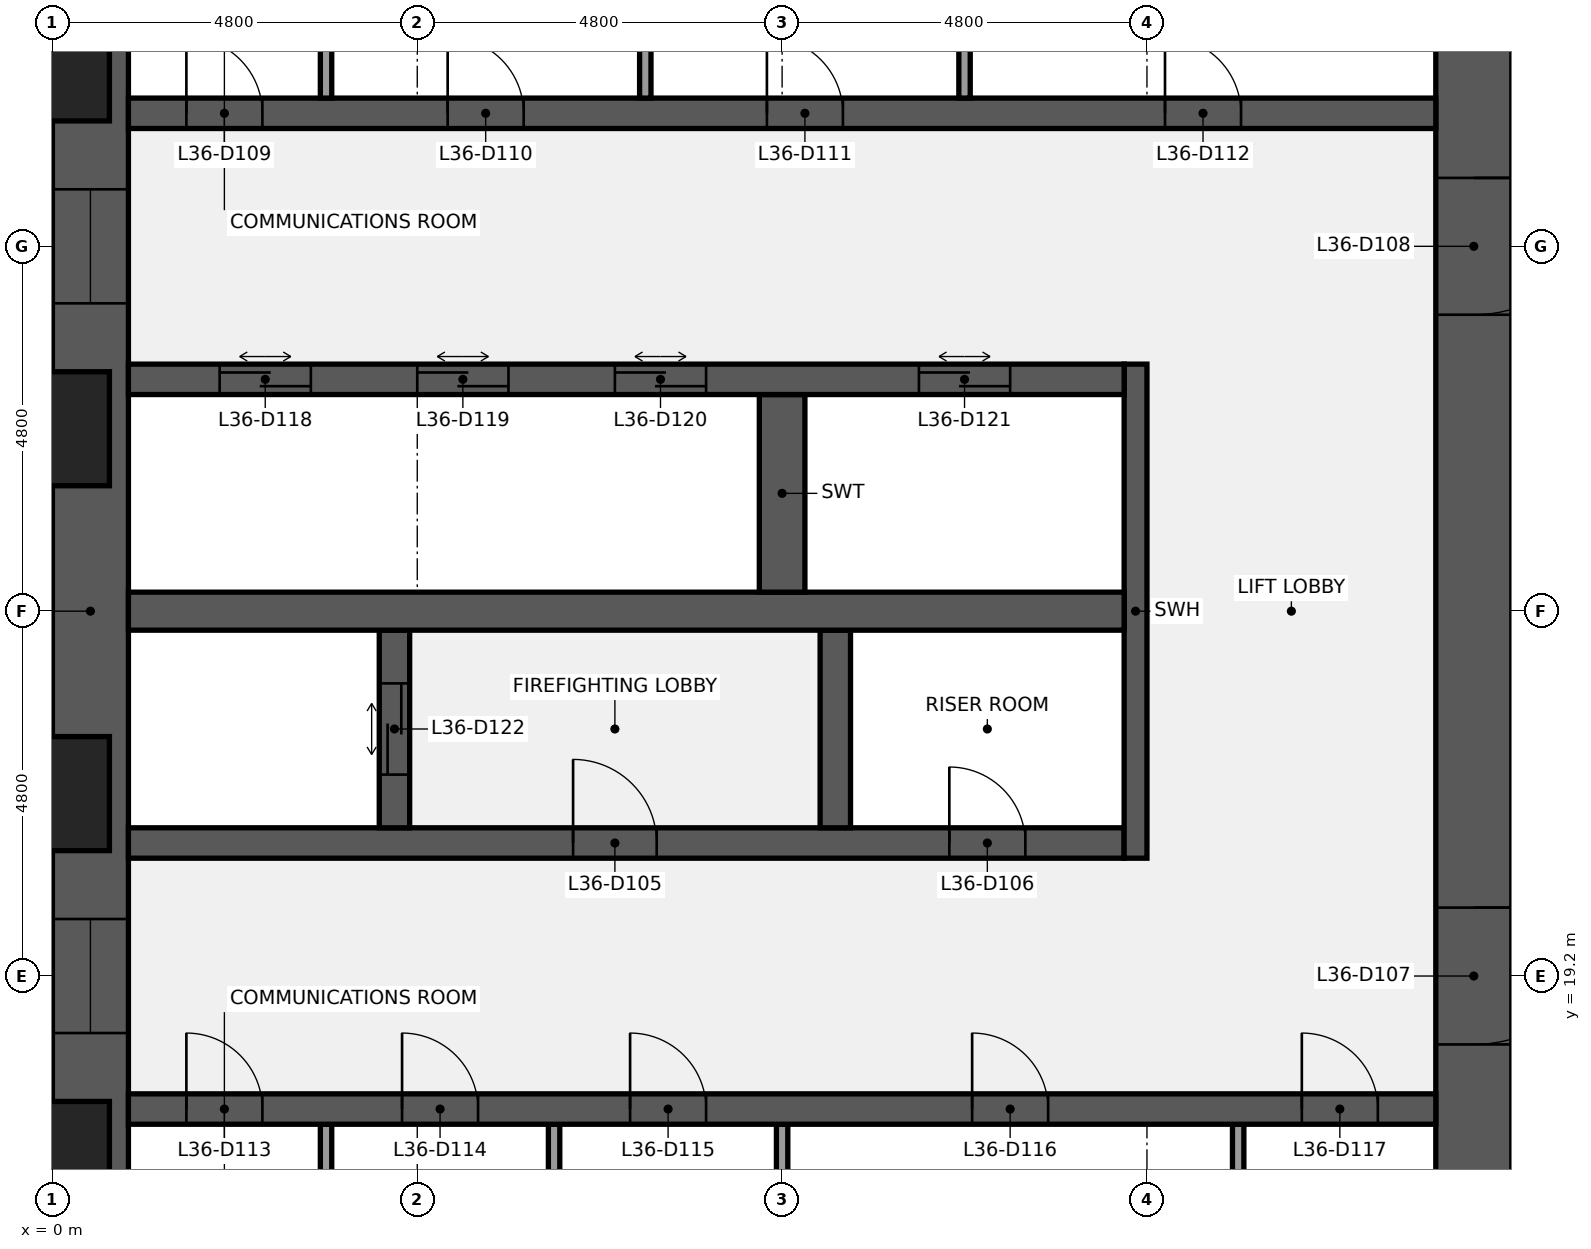
"""IFC4 building model, lengths in metres.
Left out: names, types, materials, properties, quantities, classifications, styles, units other than length and angle.
Written with IfcOpenShell. Run it as: python <this file> out.ifc"""

import sys

from ifc_helpers import new_model, si_unit, direction, frame, frame_2d, origin, place, context, subcontext, project, spatial, rectangle, extrude, element, fill, save


model = new_model("IFC4")
c1 = context("Model", 3, precision=1e-05, world=origin(), true_north=direction((0.0, 1.0)))
c2 = subcontext(c1, "Body", "Model", "MODEL_VIEW")
j1 = project(units=[si_unit("LENGTHUNIT", "METRE"), si_unit("PLANEANGLEUNIT", "RADIAN")], contexts=[c1])
p1 = place(None, origin())
s1 = spatial("IfcSite", under=j1, at=p1, CompositionType="ELEMENT")
p2 = place(p1, origin())
s2 = spatial("IfcBuilding", under=s1, at=p2, CompositionType="ELEMENT")
p3 = place(p2, frame((0.0, 0.0, 164.1)))
s3 = spatial("IfcBuildingStorey", under=s2, at=p3, CompositionType="ELEMENT", Elevation=164.1)
p4 = place(p3, frame((0.5, 9.6, 0.0), z_axis=(0.0, 0.0, 1.0), x_axis=(0.0, 1.0, 0.0)))
e1 = element("IfcWall", 1, at=p4, inside=s3, PredefinedType="SHEAR", context=c2, shape_type="SweptSolid", body=[
    extrude(rectangle(XDim=28.8, YDim=1.0, at=frame_2d((14.4, 0.0))), origin(), (0.0, 0.0, 1.0), 3.84),
])
p5 = place(p4, frame((8.85, 0.0, 0.9)))
e2 = element("IfcOpeningElement", 2, at=p5, cuts=e1, PredefinedType="OPENING", context=c2, shape_type="SweptSolid", body=[
    extrude(rectangle(XDim=1.5, YDim=1.5, at=frame_2d((0.75, 0.75))), frame((0.0, 0.51, 0.0), z_axis=(0.0, -1.0, 0.0), x_axis=(1.0, 0.0, 0.0)), (0.0, 0.0, 1.0), 1.02),
])
p6 = place(p4, frame((18.45, 0.0, 0.9)))
e3 = element("IfcOpeningElement", 3, at=p6, cuts=e1, PredefinedType="OPENING", context=c2, shape_type="SweptSolid", body=[
    extrude(rectangle(XDim=1.5, YDim=1.5, at=frame_2d((0.75, 0.75))), frame((0.0, 0.51, 0.0), z_axis=(0.0, -1.0, 0.0), x_axis=(1.0, 0.0, 0.0)), (0.0, 0.0, 1.0), 1.02),
])
p7 = place(p3, frame((18.7, 38.4, 0.0), z_axis=(0.0, 0.0, 1.0), x_axis=(0.0, -1.0, 0.0)))
e4 = element("IfcWall", 4, at=p7, inside=s3, PredefinedType="SHEAR", context=c2, shape_type="SweptSolid", body=[
    extrude(rectangle(XDim=28.8, YDim=1.0, at=frame_2d((14.4, 0.0))), origin(), (0.0, 0.0, 1.0), 3.84),
])
p8 = place(p7, frame((18.3, 0.0, 0.0)))
e5 = element("IfcOpeningElement", 5, at=p8, cuts=e4, PredefinedType="OPENING", context=c2, shape_type="SweptSolid", body=[
    extrude(rectangle(XDim=1.8, YDim=2.1, at=frame_2d((0.9, 1.05))), frame((0.0, 0.51, 0.0), z_axis=(0.0, -1.0, 0.0), x_axis=(1.0, 0.0, 0.0)), (0.0, 0.0, 1.0), 1.02),
])
p9 = place(p7, frame((8.7, 0.0, 0.0)))
e6 = element("IfcOpeningElement", 6, at=p9, cuts=e4, PredefinedType="OPENING", context=c2, shape_type="SweptSolid", body=[
    extrude(rectangle(XDim=1.8, YDim=2.1, at=frame_2d((0.9, 1.05))), frame((0.0, 0.51, 0.0), z_axis=(0.0, -1.0, 0.0), x_axis=(1.0, 0.0, 0.0)), (0.0, 0.0, 1.0), 1.02),
])
for number, where, z_axis, x_axis in (
    (7, (3.6, 14.65, 0.0), (0.0, 0.0, 1.0), (0.0, 1.0, 0.0)),
    (8, (6.6, 14.65, 0.0), (0.0, 0.0, 1.0), (0.0, 1.0, 0.0)),
    (9, (9.6, 14.65, 0.0), (0.0, 0.0, 1.0), (0.0, 1.0, 0.0)),
    (10, (15.6, 14.65, 0.0), (0.0, 0.0, 1.0), (0.0, 1.0, 0.0)),
):
    element("IfcWall", number, at=place(p3, frame(where, z_axis=z_axis, x_axis=x_axis)), inside=s3, PredefinedType="PARTITIONING", context=c2, shape_type="SweptSolid", body=[
        extrude(rectangle(XDim=2.6, YDim=0.15, at=frame_2d((1.3, 0.0))), origin(), (0.0, 0.0, 1.0), 3.84),
    ])
p10 = place(p3, frame((1.0, 17.45, 0.0), z_axis=(0.0, 0.0, 1.0), x_axis=(1.0, 0.0, 0.0)))
e11 = element("IfcWall", 11, at=p10, inside=s3, PredefinedType="SHEAR", context=c2, shape_type="SweptSolid", body=[
    extrude(rectangle(XDim=17.2, YDim=0.4, at=frame_2d((8.6, 0.0))), origin(), (0.0, 0.0, 1.0), 3.84),
])
p11 = place(p10, frame((0.762, 0.0, 0.0)))
e12 = element("IfcOpeningElement", 12, at=p11, cuts=e11, PredefinedType="OPENING", context=c2, shape_type="SweptSolid", body=[
    extrude(rectangle(XDim=1.0, YDim=2.1, at=frame_2d((0.5, 1.05))), frame((0.0, 0.21, 0.0), z_axis=(0.0, -1.0, 0.0), x_axis=(1.0, 0.0, 0.0)), (0.0, 0.0, 1.0), 0.42),
])
p12 = place(p10, frame((3.6, 0.0, 0.0)))
e13 = element("IfcOpeningElement", 13, at=p12, cuts=e11, PredefinedType="OPENING", context=c2, shape_type="SweptSolid", body=[
    extrude(rectangle(XDim=1.0, YDim=2.1, at=frame_2d((0.5, 1.05))), frame((0.0, 0.21, 0.0), z_axis=(0.0, -1.0, 0.0), x_axis=(1.0, 0.0, 0.0)), (0.0, 0.0, 1.0), 0.42),
])
p13 = place(p10, frame((6.6, 0.0, 0.0)))
e14 = element("IfcOpeningElement", 14, at=p13, cuts=e11, PredefinedType="OPENING", context=c2, shape_type="SweptSolid", body=[
    extrude(rectangle(XDim=1.0, YDim=2.1, at=frame_2d((0.5, 1.05))), frame((0.0, 0.21, 0.0), z_axis=(0.0, -1.0, 0.0), x_axis=(1.0, 0.0, 0.0)), (0.0, 0.0, 1.0), 0.42),
])
p14 = place(p10, frame((11.1, 0.0, 0.0)))
e15 = element("IfcOpeningElement", 15, at=p14, cuts=e11, PredefinedType="OPENING", context=c2, shape_type="SweptSolid", body=[
    extrude(rectangle(XDim=1.0, YDim=2.1, at=frame_2d((0.5, 1.05))), frame((0.0, 0.21, 0.0), z_axis=(0.0, -1.0, 0.0), x_axis=(1.0, 0.0, 0.0)), (0.0, 0.0, 1.0), 0.42),
])
p15 = place(p10, frame((15.438, 0.0, 0.0)))
e16 = element("IfcOpeningElement", 16, at=p15, cuts=e11, PredefinedType="OPENING", context=c2, shape_type="SweptSolid", body=[
    extrude(rectangle(XDim=1.0, YDim=2.1, at=frame_2d((0.5, 1.05))), frame((0.0, 0.21, 0.0), z_axis=(0.0, -1.0, 0.0), x_axis=(1.0, 0.0, 0.0)), (0.0, 0.0, 1.0), 0.42),
])
p16 = place(p3, frame((1.0, 20.95, 0.0), z_axis=(0.0, 0.0, 1.0), x_axis=(1.0, 0.0, 0.0)))
e17 = element("IfcWall", 17, at=p16, inside=s3, PredefinedType="SHEAR", context=c2, shape_type="SweptSolid", body=[
    extrude(rectangle(XDim=13.1, YDim=0.4, at=frame_2d((6.55, 0.0))), origin(), (0.0, 0.0, 1.0), 3.84),
])
p17 = place(p16, frame((5.85, 0.0, 0.0)))
e18 = element("IfcOpeningElement", 18, at=p17, cuts=e17, PredefinedType="OPENING", context=c2, shape_type="SweptSolid", body=[
    extrude(rectangle(XDim=1.1, YDim=2.1, at=frame_2d((0.55, 1.05))), frame((0.0, 0.21, 0.0), z_axis=(0.0, -1.0, 0.0), x_axis=(1.0, 0.0, 0.0)), (0.0, 0.0, 1.0), 0.42),
])
p18 = place(p16, frame((10.8, 0.0, 0.0)))
e19 = element("IfcOpeningElement", 19, at=p18, cuts=e17, PredefinedType="OPENING", context=c2, shape_type="SweptSolid", body=[
    extrude(rectangle(XDim=1.0, YDim=2.1, at=frame_2d((0.5, 1.05))), frame((0.0, 0.21, 0.0), z_axis=(0.0, -1.0, 0.0), x_axis=(1.0, 0.0, 0.0)), (0.0, 0.0, 1.0), 0.42),
])
p19 = place(p3, frame((14.25, 20.75, 0.0), z_axis=(0.0, 0.0, 1.0), x_axis=(0.0, 1.0, 0.0)))
e20 = element("IfcWall", 20, at=p19, inside=s3, PredefinedType="SHEAR", context=c2, shape_type="SweptSolid", body=[
    extrude(rectangle(XDim=6.5, YDim=0.3, at=frame_2d((3.25, 0.0))), origin(), (0.0, 0.0, 1.0), 3.84),
])
p20 = place(p3, frame((4.5, 21.15, 0.0), z_axis=(0.0, 0.0, 1.0), x_axis=(0.0, 1.0, 0.0)))
e21 = element("IfcWall", 21, at=p20, inside=s3, PredefinedType="SHEAR", context=c2, shape_type="SweptSolid", body=[
    extrude(rectangle(XDim=2.6, YDim=0.4, at=frame_2d((1.3, 0.0))), origin(), (0.0, 0.0, 1.0), 3.84),
])
p21 = place(p20, frame((0.7, 0.0, 0.0)))
e22 = element("IfcOpeningElement", 22, at=p21, cuts=e21, PredefinedType="OPENING", context=c2, shape_type="SweptSolid", body=[
    extrude(rectangle(XDim=1.2, YDim=2.1, at=frame_2d((0.6, 1.05))), frame((0.0, 0.21, 0.0), z_axis=(0.0, -1.0, 0.0), x_axis=(1.0, 0.0, 0.0)), (0.0, 0.0, 1.0), 0.42),
])
p22 = place(p3, frame((10.3, 21.15, 0.0), z_axis=(0.0, 0.0, 1.0), x_axis=(0.0, 1.0, 0.0)))
e23 = element("IfcWall", 23, at=p22, inside=s3, PredefinedType="SHEAR", context=c2, shape_type="SweptSolid", body=[
    extrude(rectangle(XDim=2.6, YDim=0.4, at=frame_2d((1.3, 0.0))), origin(), (0.0, 0.0, 1.0), 3.84),
])
p23 = place(p3, frame((1.0, 24.0, 0.0), z_axis=(0.0, 0.0, 1.0), x_axis=(1.0, 0.0, 0.0)))
e24 = element("IfcWall", 24, at=p23, inside=s3, PredefinedType="SHEAR", context=c2, shape_type="SweptSolid", body=[
    extrude(rectangle(XDim=13.1, YDim=0.5, at=frame_2d((6.55, 0.0))), origin(), (0.0, 0.0, 1.0), 3.84),
])
p24 = place(p3, frame((9.6, 24.25, 0.0), z_axis=(0.0, 0.0, 1.0), x_axis=(0.0, 1.0, 0.0)))
e25 = element("IfcWall", 25, at=p24, inside=s3, PredefinedType="SHEAR", context=c2, shape_type="SweptSolid", body=[
    extrude(rectangle(XDim=2.6, YDim=0.6, at=frame_2d((1.3, 0.0))), origin(), (0.0, 0.0, 1.0), 3.84),
])
p25 = place(p3, frame((1.0, 27.05, 0.0), z_axis=(0.0, 0.0, 1.0), x_axis=(1.0, 0.0, 0.0)))
e26 = element("IfcWall", 26, at=p25, inside=s3, PredefinedType="SHEAR", context=c2, shape_type="SweptSolid", body=[
    extrude(rectangle(XDim=13.1, YDim=0.4, at=frame_2d((6.55, 0.0))), origin(), (0.0, 0.0, 1.0), 3.84),
])
p26 = place(p25, frame((1.2, 0.0, 0.0)))
e27 = element("IfcOpeningElement", 27, at=p26, cuts=e26, PredefinedType="OPENING", context=c2, shape_type="SweptSolid", body=[
    extrude(rectangle(XDim=1.2, YDim=2.1, at=frame_2d((0.6, 1.05))), frame((0.0, 0.21, 0.0), z_axis=(0.0, -1.0, 0.0), x_axis=(1.0, 0.0, 0.0)), (0.0, 0.0, 1.0), 0.42),
])
p27 = place(p25, frame((3.8, 0.0, 0.0)))
e28 = element("IfcOpeningElement", 28, at=p27, cuts=e26, PredefinedType="OPENING", context=c2, shape_type="SweptSolid", body=[
    extrude(rectangle(XDim=1.2, YDim=2.1, at=frame_2d((0.6, 1.05))), frame((0.0, 0.21, 0.0), z_axis=(0.0, -1.0, 0.0), x_axis=(1.0, 0.0, 0.0)), (0.0, 0.0, 1.0), 0.42),
])
p28 = place(p25, frame((6.4, 0.0, 0.0)))
e29 = element("IfcOpeningElement", 29, at=p28, cuts=e26, PredefinedType="OPENING", context=c2, shape_type="SweptSolid", body=[
    extrude(rectangle(XDim=1.2, YDim=2.1, at=frame_2d((0.6, 1.05))), frame((0.0, 0.21, 0.0), z_axis=(0.0, -1.0, 0.0), x_axis=(1.0, 0.0, 0.0)), (0.0, 0.0, 1.0), 0.42),
])
p29 = place(p25, frame((10.4, 0.0, 0.0)))
e30 = element("IfcOpeningElement", 30, at=p29, cuts=e26, PredefinedType="OPENING", context=c2, shape_type="SweptSolid", body=[
    extrude(rectangle(XDim=1.2, YDim=2.1, at=frame_2d((0.6, 1.05))), frame((0.0, 0.21, 0.0), z_axis=(0.0, -1.0, 0.0), x_axis=(1.0, 0.0, 0.0)), (0.0, 0.0, 1.0), 0.42),
])
p30 = place(p3, frame((1.0, 30.55, 0.0), z_axis=(0.0, 0.0, 1.0), x_axis=(1.0, 0.0, 0.0)))
e31 = element("IfcWall", 31, at=p30, inside=s3, PredefinedType="SHEAR", context=c2, shape_type="SweptSolid", body=[
    extrude(rectangle(XDim=17.2, YDim=0.4, at=frame_2d((8.6, 0.0))), origin(), (0.0, 0.0, 1.0), 3.84),
])
p31 = place(p30, frame((0.762, 0.0, 0.0)))
e32 = element("IfcOpeningElement", 32, at=p31, cuts=e31, PredefinedType="OPENING", context=c2, shape_type="SweptSolid", body=[
    extrude(rectangle(XDim=1.0, YDim=2.1, at=frame_2d((0.5, 1.05))), frame((0.0, 0.21, 0.0), z_axis=(0.0, -1.0, 0.0), x_axis=(1.0, 0.0, 0.0)), (0.0, 0.0, 1.0), 0.42),
])
p32 = place(p30, frame((4.2, 0.0, 0.0)))
e33 = element("IfcOpeningElement", 33, at=p32, cuts=e31, PredefinedType="OPENING", context=c2, shape_type="SweptSolid", body=[
    extrude(rectangle(XDim=1.0, YDim=2.1, at=frame_2d((0.5, 1.05))), frame((0.0, 0.21, 0.0), z_axis=(0.0, -1.0, 0.0), x_axis=(1.0, 0.0, 0.0)), (0.0, 0.0, 1.0), 0.42),
])
p33 = place(p30, frame((8.4, 0.0, 0.0)))
e34 = element("IfcOpeningElement", 34, at=p33, cuts=e31, PredefinedType="OPENING", context=c2, shape_type="SweptSolid", body=[
    extrude(rectangle(XDim=1.0, YDim=2.1, at=frame_2d((0.5, 1.05))), frame((0.0, 0.21, 0.0), z_axis=(0.0, -1.0, 0.0), x_axis=(1.0, 0.0, 0.0)), (0.0, 0.0, 1.0), 0.42),
])
p34 = place(p30, frame((13.637, 0.0, 0.0)))
e35 = element("IfcOpeningElement", 35, at=p34, cuts=e31, PredefinedType="OPENING", context=c2, shape_type="SweptSolid", body=[
    extrude(rectangle(XDim=1.0, YDim=2.1, at=frame_2d((0.5, 1.05))), frame((0.0, 0.21, 0.0), z_axis=(0.0, -1.0, 0.0), x_axis=(1.0, 0.0, 0.0)), (0.0, 0.0, 1.0), 0.42),
])
for number, where, z_axis, x_axis in (
    (36, (3.6, 30.75, 0.0), (0.0, 0.0, 1.0), (0.0, 1.0, 0.0)),
    (37, (7.8, 30.75, 0.0), (0.0, 0.0, 1.0), (0.0, 1.0, 0.0)),
    (38, (12.0, 30.75, 0.0), (0.0, 0.0, 1.0), (0.0, 1.0, 0.0)),
):
    element("IfcWall", number, at=place(p3, frame(where, z_axis=z_axis, x_axis=x_axis)), inside=s3, PredefinedType="PARTITIONING", context=c2, shape_type="SweptSolid", body=[
        extrude(rectangle(XDim=2.6, YDim=0.15, at=frame_2d((1.3, 0.0))), origin(), (0.0, 0.0, 1.0), 3.84),
    ])
p35 = place(p17, origin())
e39 = element("IfcDoor", 39, at=p35, inside=s3, OperationType="SINGLE_SWING_LEFT", PredefinedType="DOOR", context=c2, shape_type="SweptSolid", body=[
    extrude(rectangle(XDim=1.1, YDim=2.1, at=frame_2d((0.55, 1.05))), frame((0.0, 0.025, 0.0), z_axis=(0.0, -1.0, 0.0), x_axis=(1.0, 0.0, 0.0)), (0.0, 0.0, 1.0), 0.05),
])
fill(e18, e39)
p36 = place(p18, origin())
e40 = element("IfcDoor", 40, at=p36, inside=s3, OperationType="SINGLE_SWING_LEFT", PredefinedType="DOOR", context=c2, shape_type="SweptSolid", body=[
    extrude(rectangle(XDim=1.0, YDim=2.1, at=frame_2d((0.5, 1.05))), frame((0.0, 0.025, 0.0), z_axis=(0.0, -1.0, 0.0), x_axis=(1.0, 0.0, 0.0)), (0.0, 0.0, 1.0), 0.05),
])
fill(e19, e40)
p37 = place(p8, origin())
e41 = element("IfcDoor", 41, at=p37, inside=s3, OperationType="DOUBLE_DOOR_SINGLE_SWING", PredefinedType="DOOR", context=c2, shape_type="SweptSolid", body=[
    extrude(rectangle(XDim=1.8, YDim=2.1, at=frame_2d((0.9, 1.05))), frame((0.0, 0.025, 0.0), z_axis=(0.0, -1.0, 0.0), x_axis=(1.0, 0.0, 0.0)), (0.0, 0.0, 1.0), 0.05),
])
fill(e5, e41)
p38 = place(p9, origin())
e42 = element("IfcDoor", 42, at=p38, inside=s3, OperationType="DOUBLE_DOOR_SINGLE_SWING", PredefinedType="DOOR", context=c2, shape_type="SweptSolid", body=[
    extrude(rectangle(XDim=1.8, YDim=2.1, at=frame_2d((0.9, 1.05))), frame((0.0, 0.025, 0.0), z_axis=(0.0, -1.0, 0.0), x_axis=(1.0, 0.0, 0.0)), (0.0, 0.0, 1.0), 0.05),
])
fill(e6, e42)
p39 = place(p31, origin())
e43 = element("IfcDoor", 43, at=p39, inside=s3, OperationType="SINGLE_SWING_LEFT", PredefinedType="DOOR", context=c2, shape_type="SweptSolid", body=[
    extrude(rectangle(XDim=1.0, YDim=2.1, at=frame_2d((0.5, 1.05))), frame((0.0, 0.025, 0.0), z_axis=(0.0, -1.0, 0.0), x_axis=(1.0, 0.0, 0.0)), (0.0, 0.0, 1.0), 0.05),
])
fill(e32, e43)
p40 = place(p32, origin())
e44 = element("IfcDoor", 44, at=p40, inside=s3, OperationType="SINGLE_SWING_LEFT", PredefinedType="DOOR", context=c2, shape_type="SweptSolid", body=[
    extrude(rectangle(XDim=1.0, YDim=2.1, at=frame_2d((0.5, 1.05))), frame((0.0, 0.025, 0.0), z_axis=(0.0, -1.0, 0.0), x_axis=(1.0, 0.0, 0.0)), (0.0, 0.0, 1.0), 0.05),
])
fill(e33, e44)
p41 = place(p33, origin())
e45 = element("IfcDoor", 45, at=p41, inside=s3, OperationType="SINGLE_SWING_LEFT", PredefinedType="DOOR", context=c2, shape_type="SweptSolid", body=[
    extrude(rectangle(XDim=1.0, YDim=2.1, at=frame_2d((0.5, 1.05))), frame((0.0, 0.025, 0.0), z_axis=(0.0, -1.0, 0.0), x_axis=(1.0, 0.0, 0.0)), (0.0, 0.0, 1.0), 0.05),
])
fill(e34, e45)
p42 = place(p34, origin())
e46 = element("IfcDoor", 46, at=p42, inside=s3, OperationType="SINGLE_SWING_LEFT", PredefinedType="DOOR", context=c2, shape_type="SweptSolid", body=[
    extrude(rectangle(XDim=1.0, YDim=2.1, at=frame_2d((0.5, 1.05))), frame((0.0, 0.025, 0.0), z_axis=(0.0, -1.0, 0.0), x_axis=(1.0, 0.0, 0.0)), (0.0, 0.0, 1.0), 0.05),
])
fill(e35, e46)
p43 = place(p11, origin())
e47 = element("IfcDoor", 47, at=p43, inside=s3, OperationType="SINGLE_SWING_LEFT", PredefinedType="DOOR", context=c2, shape_type="SweptSolid", body=[
    extrude(rectangle(XDim=1.0, YDim=2.1, at=frame_2d((0.5, 1.05))), frame((0.0, 0.025, 0.0), z_axis=(0.0, -1.0, 0.0), x_axis=(1.0, 0.0, 0.0)), (0.0, 0.0, 1.0), 0.05),
])
fill(e12, e47)
p44 = place(p12, origin())
e48 = element("IfcDoor", 48, at=p44, inside=s3, OperationType="SINGLE_SWING_LEFT", PredefinedType="DOOR", context=c2, shape_type="SweptSolid", body=[
    extrude(rectangle(XDim=1.0, YDim=2.1, at=frame_2d((0.5, 1.05))), frame((0.0, 0.025, 0.0), z_axis=(0.0, -1.0, 0.0), x_axis=(1.0, 0.0, 0.0)), (0.0, 0.0, 1.0), 0.05),
])
fill(e13, e48)
p45 = place(p13, origin())
e49 = element("IfcDoor", 49, at=p45, inside=s3, OperationType="SINGLE_SWING_LEFT", PredefinedType="DOOR", context=c2, shape_type="SweptSolid", body=[
    extrude(rectangle(XDim=1.0, YDim=2.1, at=frame_2d((0.5, 1.05))), frame((0.0, 0.025, 0.0), z_axis=(0.0, -1.0, 0.0), x_axis=(1.0, 0.0, 0.0)), (0.0, 0.0, 1.0), 0.05),
])
fill(e14, e49)
p46 = place(p14, origin())
e50 = element("IfcDoor", 50, at=p46, inside=s3, OperationType="SINGLE_SWING_LEFT", PredefinedType="DOOR", context=c2, shape_type="SweptSolid", body=[
    extrude(rectangle(XDim=1.0, YDim=2.1, at=frame_2d((0.5, 1.05))), frame((0.0, 0.025, 0.0), z_axis=(0.0, -1.0, 0.0), x_axis=(1.0, 0.0, 0.0)), (0.0, 0.0, 1.0), 0.05),
])
fill(e15, e50)
p47 = place(p15, origin())
e51 = element("IfcDoor", 51, at=p47, inside=s3, OperationType="SINGLE_SWING_LEFT", PredefinedType="DOOR", context=c2, shape_type="SweptSolid", body=[
    extrude(rectangle(XDim=1.0, YDim=2.1, at=frame_2d((0.5, 1.05))), frame((0.0, 0.025, 0.0), z_axis=(0.0, -1.0, 0.0), x_axis=(1.0, 0.0, 0.0)), (0.0, 0.0, 1.0), 0.05),
])
fill(e16, e51)
p48 = place(p26, origin())
e52 = element("IfcDoor", 52, at=p48, inside=s3, OperationType="DOUBLE_DOOR_SLIDING", PredefinedType="DOOR", context=c2, shape_type="SweptSolid", body=[
    extrude(rectangle(XDim=1.2, YDim=2.1, at=frame_2d((0.6, 1.05))), frame((0.0, 0.025, 0.0), z_axis=(0.0, -1.0, 0.0), x_axis=(1.0, 0.0, 0.0)), (0.0, 0.0, 1.0), 0.05),
])
fill(e27, e52)
p49 = place(p27, origin())
e53 = element("IfcDoor", 53, at=p49, inside=s3, OperationType="DOUBLE_DOOR_SLIDING", PredefinedType="DOOR", context=c2, shape_type="SweptSolid", body=[
    extrude(rectangle(XDim=1.2, YDim=2.1, at=frame_2d((0.6, 1.05))), frame((0.0, 0.025, 0.0), z_axis=(0.0, -1.0, 0.0), x_axis=(1.0, 0.0, 0.0)), (0.0, 0.0, 1.0), 0.05),
])
fill(e28, e53)
p50 = place(p28, origin())
e54 = element("IfcDoor", 54, at=p50, inside=s3, OperationType="DOUBLE_DOOR_SLIDING", PredefinedType="DOOR", context=c2, shape_type="SweptSolid", body=[
    extrude(rectangle(XDim=1.2, YDim=2.1, at=frame_2d((0.6, 1.05))), frame((0.0, 0.025, 0.0), z_axis=(0.0, -1.0, 0.0), x_axis=(1.0, 0.0, 0.0)), (0.0, 0.0, 1.0), 0.05),
])
fill(e29, e54)
p51 = place(p29, origin())
e55 = element("IfcDoor", 55, at=p51, inside=s3, OperationType="DOUBLE_DOOR_SLIDING", PredefinedType="DOOR", context=c2, shape_type="SweptSolid", body=[
    extrude(rectangle(XDim=1.2, YDim=2.1, at=frame_2d((0.6, 1.05))), frame((0.0, 0.025, 0.0), z_axis=(0.0, -1.0, 0.0), x_axis=(1.0, 0.0, 0.0)), (0.0, 0.0, 1.0), 0.05),
])
fill(e30, e55)
p52 = place(p21, origin())
e56 = element("IfcDoor", 56, at=p52, inside=s3, OperationType="DOUBLE_DOOR_SLIDING", PredefinedType="DOOR", context=c2, shape_type="SweptSolid", body=[
    extrude(rectangle(XDim=1.2, YDim=2.1, at=frame_2d((0.6, 1.05))), frame((0.0, 0.025, 0.0), z_axis=(0.0, -1.0, 0.0), x_axis=(1.0, 0.0, 0.0)), (0.0, 0.0, 1.0), 0.05),
])
fill(e22, e56)
p53 = place(p5, origin())
e57 = element("IfcWindow", 57, at=p53, inside=s3, PartitioningType="SINGLE_PANEL", PredefinedType="WINDOW", context=c2, shape_type="SweptSolid", body=[
    extrude(rectangle(XDim=1.5, YDim=1.5, at=frame_2d((0.75, 0.75))), frame((0.0, 0.03, 0.0), z_axis=(0.0, -1.0, 0.0), x_axis=(1.0, 0.0, 0.0)), (0.0, 0.0, 1.0), 0.06),
])
fill(e2, e57)
p54 = place(p6, origin())
e58 = element("IfcWindow", 58, at=p54, inside=s3, PartitioningType="SINGLE_PANEL", PredefinedType="WINDOW", context=c2, shape_type="SweptSolid", body=[
    extrude(rectangle(XDim=1.5, YDim=1.5, at=frame_2d((0.75, 0.75))), frame((0.0, 0.03, 0.0), z_axis=(0.0, -1.0, 0.0), x_axis=(1.0, 0.0, 0.0)), (0.0, 0.0, 1.0), 0.06),
])
fill(e3, e58)
save(model, sys.argv[1])
